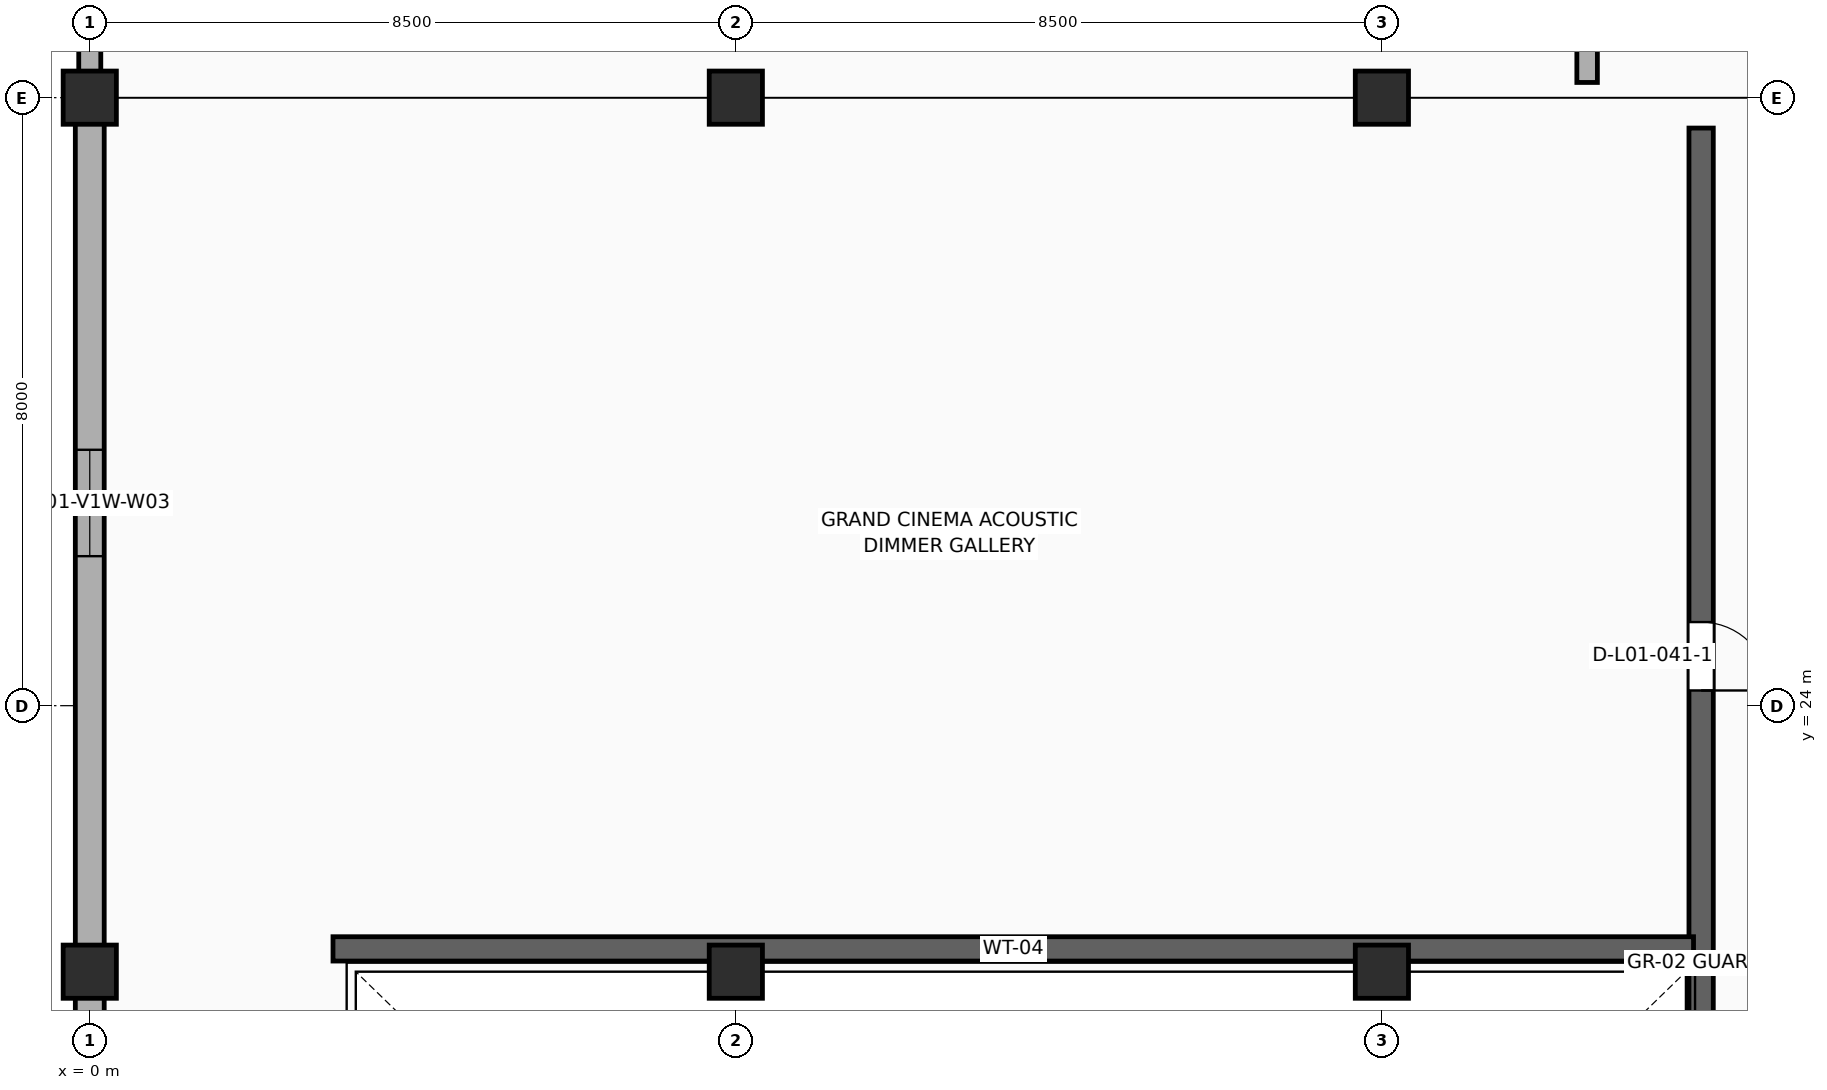
"""IFC4 building model, lengths in metres.
Left out: names, types, materials, properties, quantities, classifications, styles, units other than length and angle.
Written with IfcOpenShell. Run it as: python <this file> out.ifc"""

import sys

from ifc_helpers import new_model, si_unit, direction, frame, frame_2d, origin, origin_2d, place, context, subcontext, project, spatial, rectangle, extrude, element, fill, save


model = new_model("IFC4")
c1 = context("Model", 3, precision=1e-05, world=origin(), true_north=direction((0.0, 1.0)))
c2 = subcontext(c1, "Body", "Model", "MODEL_VIEW")
j1 = project(units=[si_unit("LENGTHUNIT", "METRE"), si_unit("PLANEANGLEUNIT", "RADIAN")], contexts=[c1])
p1 = place(None, origin())
s1 = spatial("IfcSite", under=j1, at=p1, CompositionType="ELEMENT")
p2 = place(p1, origin())
s2 = spatial("IfcBuilding", under=s1, at=p2, CompositionType="ELEMENT")
p3 = place(p2, frame((0.0, 0.0, 5.4)))
s3 = spatial("IfcBuildingStorey", under=s2, at=p3, CompositionType="ELEMENT", Elevation=5.4)
for number, where, z_axis, x_axis in (
    (1, (0.0, 20.5, 0.0), (0.0, 0.0, 1.0), (1.0, 0.0, 0.0)),
    (2, (0.0, 32.0, 0.0), (0.0, 0.0, 1.0), (1.0, 0.0, 0.0)),
    (3, (8.5, 20.5, 0.0), (0.0, 0.0, 1.0), (1.0, 0.0, 0.0)),
    (4, (8.5, 32.0, 0.0), (0.0, 0.0, 1.0), (1.0, 0.0, 0.0)),
    (5, (17.0, 20.5, 0.0), (0.0, 0.0, 1.0), (1.0, 0.0, 0.0)),
    (6, (17.0, 32.0, 0.0), (0.0, 0.0, 1.0), (1.0, 0.0, 0.0)),
):
    element("IfcColumn", number, at=place(p3, frame(where, z_axis=z_axis, x_axis=x_axis)), inside=s3, PredefinedType="COLUMN", context=c2, shape_type="SweptSolid", body=[
        extrude(rectangle(XDim=0.7, YDim=0.7, at=origin_2d()), origin(), (0.0, 0.0, 1.0), 4.54),
    ])
p4 = place(p3, frame((0.0, 0.0, 0.0), z_axis=(0.0, 0.0, 1.0), x_axis=(0.0, 1.0, 0.0)))
e7 = element("IfcWall", 7, at=p4, inside=s3, PredefinedType="STANDARD", context=c2, shape_type="SweptSolid", body=[
    extrude(rectangle(XDim=32.0, YDim=0.38, at=frame_2d((16.0, 0.0))), origin(), (0.0, 0.0, 1.0), 4.208),
])
p5 = place(p4, frame((4.633, 0.0, 1.2)))
e8 = element("IfcOpeningElement", 8, at=p5, cuts=e7, PredefinedType="OPENING", context=c2, shape_type="SweptSolid", body=[
    extrude(rectangle(XDim=1.4, YDim=1.5, at=frame_2d((0.7, 0.75))), frame((0.0, 0.202, 0.0), z_axis=(0.0, -1.0, 0.0), x_axis=(1.0, 0.0, 0.0)), (0.0, 0.0, 1.0), 0.404),
])
p6 = place(p4, frame((15.3, 0.0, 1.2)))
e9 = element("IfcOpeningElement", 9, at=p6, cuts=e7, PredefinedType="OPENING", context=c2, shape_type="SweptSolid", body=[
    extrude(rectangle(XDim=1.4, YDim=1.5, at=frame_2d((0.7, 0.75))), frame((0.0, 0.202, 0.0), z_axis=(0.0, -1.0, 0.0), x_axis=(1.0, 0.0, 0.0)), (0.0, 0.0, 1.0), 0.404),
])
p7 = place(p4, frame((25.967, 0.0, 1.2)))
e10 = element("IfcOpeningElement", 10, at=p7, cuts=e7, PredefinedType="OPENING", context=c2, shape_type="SweptSolid", body=[
    extrude(rectangle(XDim=1.4, YDim=1.5, at=frame_2d((0.7, 0.75))), frame((0.0, 0.202, 0.0), z_axis=(0.0, -1.0, 0.0), x_axis=(1.0, 0.0, 0.0)), (0.0, 0.0, 1.0), 0.404),
])
p8 = place(p3, frame((0.0, 32.0, 0.0), z_axis=(0.0, 0.0, 1.0), x_axis=(0.0, 1.0, 0.0)))
e11 = element("IfcWall", 11, at=p8, inside=s3, PredefinedType="STANDARD", context=c2, shape_type="SweptSolid", body=[
    extrude(rectangle(XDim=48.5, YDim=0.29, at=frame_2d((24.25, 0.0))), origin(), (0.0, 0.0, 1.0), 3.68),
])
p9 = place(p8, frame((3.35, 0.0, 2.12)))
e12 = element("IfcOpeningElement", 12, at=p9, cuts=e11, PredefinedType="OPENING", context=c2, shape_type="SweptSolid", body=[
    extrude(rectangle(XDim=3.0, YDim=1.4, at=frame_2d((1.5, 0.7))), frame((0.0, 0.157, 0.0), z_axis=(0.0, -1.0, 0.0), x_axis=(1.0, 0.0, 0.0)), (0.0, 0.0, 1.0), 0.314),
])
p10 = place(p8, frame((32.45, 0.0, 2.12)))
e13 = element("IfcOpeningElement", 13, at=p10, cuts=e11, PredefinedType="OPENING", context=c2, shape_type="SweptSolid", body=[
    extrude(rectangle(XDim=3.0, YDim=1.4, at=frame_2d((1.5, 0.7))), frame((0.0, 0.157, 0.0), z_axis=(0.0, -1.0, 0.0), x_axis=(1.0, 0.0, 0.0)), (0.0, 0.0, 1.0), 0.314),
])
p11 = place(p8, frame((42.15, 0.0, 2.12)))
e14 = element("IfcOpeningElement", 14, at=p11, cuts=e11, PredefinedType="OPENING", context=c2, shape_type="SweptSolid", body=[
    extrude(rectangle(XDim=3.0, YDim=1.4, at=frame_2d((1.5, 0.7))), frame((0.0, 0.157, 0.0), z_axis=(0.0, -1.0, 0.0), x_axis=(1.0, 0.0, 0.0)), (0.0, 0.0, 1.0), 0.314),
])
p12 = place(p3, frame((21.2, 3.2, 0.0), z_axis=(0.0, 0.0, 1.0), x_axis=(0.0, 1.0, 0.0)))
e15 = element("IfcWall", 15, at=p12, inside=s3, PredefinedType="SHEAR", context=c2, shape_type="SweptSolid", body=[
    extrude(rectangle(XDim=28.4, YDim=0.32, at=frame_2d((14.2, 0.0))), origin(), (0.0, 0.0, 1.0), 4.5),
])
p13 = place(p12, frame((21.0, 0.0, 0.0)))
e16 = element("IfcOpeningElement", 16, at=p13, cuts=e15, PredefinedType="OPENING", context=c2, shape_type="SweptSolid", body=[
    extrude(rectangle(XDim=0.9, YDim=2.1, at=frame_2d((0.45, 1.05))), frame((0.0, 0.172, 0.0), z_axis=(0.0, -1.0, 0.0), x_axis=(1.0, 0.0, 0.0)), (0.0, 0.0, 1.0), 0.344),
])
p14 = place(p3, frame((3.2, 20.8, 0.0), z_axis=(0.0, 0.0, 1.0), x_axis=(1.0, 0.0, 0.0)))
e17 = element("IfcWall", 17, at=p14, inside=s3, PredefinedType="SHEAR", context=c2, shape_type="SweptSolid", body=[
    extrude(rectangle(XDim=17.9, YDim=0.32, at=frame_2d((8.95, 0.0))), origin(), (0.0, 0.0, 1.0), 4.5),
])
p15 = place(p3, frame((19.7, 32.2, 0.0), z_axis=(0.0, 0.0, 1.0), x_axis=(0.0, 1.0, 0.0)))
e18 = element("IfcWall", 18, at=p15, inside=s3, PredefinedType="PARTITIONING", context=c2, shape_type="SweptSolid", body=[
    extrude(rectangle(XDim=48.0, YDim=0.27, at=frame_2d((24.0, 0.0))), origin(), (0.0, 0.0, 1.0), 3.728),
])
p16 = place(p15, frame((10.0, 0.0, 0.0)))
e19 = element("IfcOpeningElement", 19, at=p16, cuts=e18, PredefinedType="OPENING", context=c2, shape_type="SweptSolid", body=[
    extrude(rectangle(XDim=1.8, YDim=2.4, at=frame_2d((0.9, 1.2))), frame((0.0, 0.147, 0.0), z_axis=(0.0, -1.0, 0.0), x_axis=(1.0, 0.0, 0.0)), (0.0, 0.0, 1.0), 0.294),
])
p17 = place(p15, frame((34.0, 0.0, 0.0)))
e20 = element("IfcOpeningElement", 20, at=p17, cuts=e18, PredefinedType="OPENING", context=c2, shape_type="SweptSolid", body=[
    extrude(rectangle(XDim=1.8, YDim=2.4, at=frame_2d((0.9, 1.2))), frame((0.0, 0.147, 0.0), z_axis=(0.0, -1.0, 0.0), x_axis=(1.0, 0.0, 0.0)), (0.0, 0.0, 1.0), 0.294),
])
p18 = place(p7, origin())
e21 = element("IfcWindow", 21, at=p18, inside=s3, PartitioningType="SINGLE_PANEL", PredefinedType="WINDOW", context=c2, shape_type="SweptSolid", body=[
    extrude(rectangle(XDim=1.4, YDim=1.5, at=frame_2d((0.7, 0.75))), frame((0.0, 0.03, 0.0), z_axis=(0.0, -1.0, 0.0), x_axis=(1.0, 0.0, 0.0)), (0.0, 0.0, 1.0), 0.06),
])
fill(e10, e21)
p19 = place(p13, frame((0.9, 0.0, 0.0), z_axis=(0.0, 0.0, 1.0), x_axis=(-1.0, 0.0, 0.0)))
e22 = element("IfcDoor", 22, at=p19, inside=s3, OperationType="SINGLE_SWING_LEFT", PredefinedType="DOOR", context=c2, shape_type="SweptSolid", body=[
    extrude(rectangle(XDim=0.9, YDim=2.1, at=frame_2d((0.45, 1.05))), frame((0.0, 0.025, 0.0), z_axis=(0.0, -1.0, 0.0), x_axis=(1.0, 0.0, 0.0)), (0.0, 0.0, 1.0), 0.05),
])
fill(e16, e22)
save(model, sys.argv[1])
